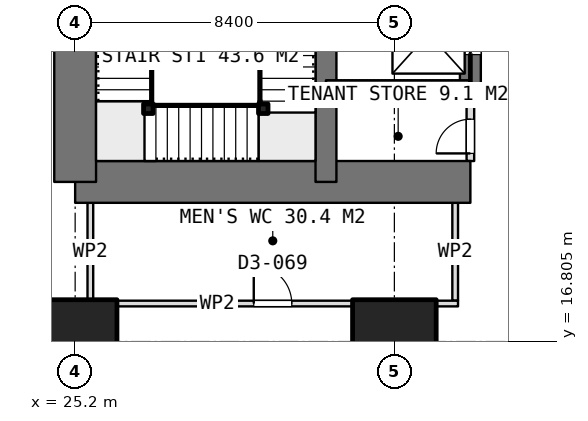
"""IFC4 building model, lengths in metres.
Left out: names, types, materials, properties, quantities, classifications, styles, units other than length and angle.
Written with IfcOpenShell. Run it as: python <this file> out.ifc"""

import sys

from ifc_helpers import new_model, si_unit, direction, frame, frame_2d, origin, origin_2d, place, context, subcontext, project, spatial, rectangle, extrude, element, fill, save


model = new_model("IFC4")
c1 = context("Model", 3, precision=1e-05, world=origin(), true_north=direction((0.0, 1.0)))
c2 = subcontext(c1, "Body", "Model", "MODEL_VIEW")
j1 = project(units=[si_unit("LENGTHUNIT", "METRE"), si_unit("PLANEANGLEUNIT", "RADIAN")], contexts=[c1])
p1 = place(None, origin())
s1 = spatial("IfcSite", under=j1, at=p1, CompositionType="ELEMENT")
p2 = place(p1, origin())
s2 = spatial("IfcBuilding", under=s1, at=p2, CompositionType="ELEMENT")
p3 = place(p2, frame((0.0, 0.0, 62.9)))
s3 = spatial("IfcBuildingStorey", under=s2, at=p3, CompositionType="ELEMENT", Elevation=62.9)
p4 = place(p3, frame((25.2, 21.0, 0.0), z_axis=(0.0, 0.0, 1.0), x_axis=(1.0, 0.0, 0.0)))
e1 = element("IfcWall", 1, at=p4, inside=s3, PredefinedType="SHEAR", context=c2, shape_type="SweptSolid", body=[
    extrude(rectangle(XDim=10.4, YDim=1.1, at=frame_2d((5.2, 0.0))), origin(), (0.0, 0.0, 1.0), 3.75),
])
p5 = place(p3, frame((25.2, 21.0, 0.0), z_axis=(0.0, 0.0, 1.0), x_axis=(0.0, 1.0, 0.0)))
e2 = element("IfcWall", 2, at=p5, inside=s3, PredefinedType="SHEAR", context=c2, shape_type="SweptSolid", body=[
    extrude(rectangle(XDim=25.2, YDim=1.1, at=frame_2d((12.6, 0.0))), origin(), (0.0, 0.0, 1.0), 3.75),
])
p6 = place(p5, frame((7.8, 0.0, 0.0)))
e3 = element("IfcOpeningElement", 3, at=p6, cuts=e2, PredefinedType="OPENING", context=c2, shape_type="SweptSolid", body=[
    extrude(rectangle(XDim=1.2, YDim=2.1, at=frame_2d((0.6, 1.05))), frame((0.0, 0.56, 0.0), z_axis=(0.0, -1.0, 0.0), x_axis=(1.0, 0.0, 0.0)), (0.0, 0.0, 1.0), 1.12),
])
p7 = place(p5, frame((14.25, 0.0, 0.0)))
e4 = element("IfcOpeningElement", 4, at=p7, cuts=e2, PredefinedType="OPENING", context=c2, shape_type="SweptSolid", body=[
    extrude(rectangle(XDim=0.9, YDim=2.1, at=frame_2d((0.45, 1.05))), frame((0.0, 0.56, 0.0), z_axis=(0.0, -1.0, 0.0), x_axis=(1.0, 0.0, 0.0)), (0.0, 0.0, 1.0), 1.12),
])
p8 = place(p5, frame((16.85, 0.0, 0.0)))
e5 = element("IfcOpeningElement", 5, at=p8, cuts=e2, PredefinedType="OPENING", context=c2, shape_type="SweptSolid", body=[
    extrude(rectangle(XDim=0.9, YDim=2.1, at=frame_2d((0.45, 1.05))), frame((0.0, 0.56, 0.0), z_axis=(0.0, -1.0, 0.0), x_axis=(1.0, 0.0, 0.0)), (0.0, 0.0, 1.0), 1.12),
])
p9 = place(p5, frame((19.075, 0.0, 0.0)))
e6 = element("IfcOpeningElement", 6, at=p9, cuts=e2, PredefinedType="OPENING", context=c2, shape_type="SweptSolid", body=[
    extrude(rectangle(XDim=1.2, YDim=2.1, at=frame_2d((0.6, 1.05))), frame((0.0, 0.56, 0.0), z_axis=(0.0, -1.0, 0.0), x_axis=(1.0, 0.0, 0.0)), (0.0, 0.0, 1.0), 1.12),
])
p10 = place(p3, frame((31.8, 21.0, 0.0), z_axis=(0.0, 0.0, 1.0), x_axis=(0.0, 1.0, 0.0)))
e7 = element("IfcWall", 7, at=p10, inside=s3, PredefinedType="SHEAR", context=c2, shape_type="SweptSolid", body=[
    extrude(rectangle(XDim=25.2, YDim=0.55, at=frame_2d((12.6, 0.0))), origin(), (0.0, 0.0, 1.0), 3.75),
])
p11 = place(p3, frame((35.6, 23.4, 0.0), z_axis=(0.0, 0.0, 1.0), x_axis=(0.0, 1.0, 0.0)))
e8 = element("IfcWall", 8, at=p11, inside=s3, PredefinedType="SHEAR", context=c2, shape_type="SweptSolid", body=[
    extrude(rectangle(XDim=18.0, YDim=0.55, at=frame_2d((9.0, 0.0))), origin(), (0.0, 0.0, 1.0), 3.75),
])
p12 = place(p11, frame((0.95, 0.0, 0.0)))
e9 = element("IfcOpeningElement", 9, at=p12, cuts=e8, PredefinedType="OPENING", context=c2, shape_type="SweptSolid", body=[
    extrude(rectangle(XDim=1.1, YDim=2.1, at=frame_2d((0.55, 1.05))), frame((0.0, 0.285, 0.0), z_axis=(0.0, -1.0, 0.0), x_axis=(1.0, 0.0, 0.0)), (0.0, 0.0, 1.0), 0.57),
])
p13 = place(p11, frame((3.95, 0.0, 0.0)))
e10 = element("IfcOpeningElement", 10, at=p13, cuts=e8, PredefinedType="OPENING", context=c2, shape_type="SweptSolid", body=[
    extrude(rectangle(XDim=1.1, YDim=2.1, at=frame_2d((0.55, 1.05))), frame((0.0, 0.285, 0.0), z_axis=(0.0, -1.0, 0.0), x_axis=(1.0, 0.0, 0.0)), (0.0, 0.0, 1.0), 0.57),
])
p14 = place(p11, frame((6.95, 0.0, 0.0)))
e11 = element("IfcOpeningElement", 11, at=p14, cuts=e8, PredefinedType="OPENING", context=c2, shape_type="SweptSolid", body=[
    extrude(rectangle(XDim=1.1, YDim=2.1, at=frame_2d((0.55, 1.05))), frame((0.0, 0.285, 0.0), z_axis=(0.0, -1.0, 0.0), x_axis=(1.0, 0.0, 0.0)), (0.0, 0.0, 1.0), 0.57),
])
p15 = place(p11, frame((9.95, 0.0, 0.0)))
e12 = element("IfcOpeningElement", 12, at=p15, cuts=e8, PredefinedType="OPENING", context=c2, shape_type="SweptSolid", body=[
    extrude(rectangle(XDim=1.1, YDim=2.1, at=frame_2d((0.55, 1.05))), frame((0.0, 0.285, 0.0), z_axis=(0.0, -1.0, 0.0), x_axis=(1.0, 0.0, 0.0)), (0.0, 0.0, 1.0), 0.57),
])
p16 = place(p11, frame((12.95, 0.0, 0.0)))
e13 = element("IfcOpeningElement", 13, at=p16, cuts=e8, PredefinedType="OPENING", context=c2, shape_type="SweptSolid", body=[
    extrude(rectangle(XDim=1.1, YDim=2.1, at=frame_2d((0.55, 1.05))), frame((0.0, 0.285, 0.0), z_axis=(0.0, -1.0, 0.0), x_axis=(1.0, 0.0, 0.0)), (0.0, 0.0, 1.0), 0.57),
])
p17 = place(p11, frame((15.95, 0.0, 0.0)))
e14 = element("IfcOpeningElement", 14, at=p17, cuts=e8, PredefinedType="OPENING", context=c2, shape_type="SweptSolid", body=[
    extrude(rectangle(XDim=1.1, YDim=2.1, at=frame_2d((0.55, 1.05))), frame((0.0, 0.285, 0.0), z_axis=(0.0, -1.0, 0.0), x_axis=(1.0, 0.0, 0.0)), (0.0, 0.0, 1.0), 0.57),
])
p18 = place(p3, frame((31.8, 23.4, 0.0), z_axis=(0.0, 0.0, 1.0), x_axis=(1.0, 0.0, 0.0)))
e15 = element("IfcWall", 15, at=p18, inside=s3, PredefinedType="SHEAR", context=c2, shape_type="SweptSolid", body=[
    extrude(rectangle(XDim=3.8, YDim=0.55, at=frame_2d((1.9, 0.0))), origin(), (0.0, 0.0, 1.0), 3.75),
])
for number, where, z_axis, x_axis in (
    (16, (25.2, 16.8, 0.0), (0.0, 0.0, 1.0), (1.0, 0.0, 0.0)),
    (17, (33.6, 16.8, 0.0), (0.0, 0.0, 1.0), (1.0, 0.0, 0.0)),
):
    element("IfcColumn", number, at=place(p3, frame(where, z_axis=z_axis, x_axis=x_axis)), inside=s3, PredefinedType="COLUMN", context=c2, shape_type="SweptSolid", body=[
        extrude(rectangle(XDim=2.2, YDim=2.2, at=origin_2d()), origin(), (0.0, 0.0, 1.0), 3.75),
    ])
p19 = place(p3, frame((35.6, 21.55, 0.0), z_axis=(0.0, 0.0, 1.0), x_axis=(0.0, 1.0, 0.0)))
e18 = element("IfcWall", 18, at=p19, inside=s3, PredefinedType="PARTITIONING", context=c2, shape_type="SweptSolid", body=[
    extrude(rectangle(XDim=1.575, YDim=0.2, at=frame_2d((0.788, 0.0))), origin(), (0.0, 0.0, 1.0), 3.5),
])
p20 = place(p19, frame((0.2, 0.0, 0.0)))
e19 = element("IfcOpeningElement", 19, at=p20, cuts=e18, PredefinedType="OPENING", context=c2, shape_type="SweptSolid", body=[
    extrude(rectangle(XDim=0.9, YDim=2.1, at=frame_2d((0.45, 1.05))), frame((0.0, 0.11, 0.0), z_axis=(0.0, -1.0, 0.0), x_axis=(1.0, 0.0, 0.0)), (0.0, 0.0, 1.0), 0.22),
])
p21 = place(p3, frame((25.525, 17.8, 0.0), z_axis=(0.0, 0.0, 1.0), x_axis=(1.0, 0.0, 0.0)))
e20 = element("IfcWall", 20, at=p21, inside=s3, PredefinedType="PARTITIONING", context=c2, shape_type="SweptSolid", body=[
    extrude(rectangle(XDim=9.75, YDim=0.15, at=frame_2d((4.875, 0.0))), origin(), (0.0, 0.0, 1.0), 3.5),
])
p22 = place(p21, frame((4.375, 0.0, 0.0)))
e21 = element("IfcOpeningElement", 21, at=p22, cuts=e20, PredefinedType="OPENING", context=c2, shape_type="SweptSolid", body=[
    extrude(rectangle(XDim=1.0, YDim=2.1, at=frame_2d((0.5, 1.05))), frame((0.0, 0.085, 0.0), z_axis=(0.0, -1.0, 0.0), x_axis=(1.0, 0.0, 0.0)), (0.0, 0.0, 1.0), 0.17),
])
for number, where, z_axis, x_axis in (
    (22, (25.6, 17.875, 0.0), (0.0, 0.0, 1.0), (0.0, 1.0, 0.0)),
    (23, (35.2, 17.875, 0.0), (0.0, 0.0, 1.0), (0.0, 1.0, 0.0)),
):
    element("IfcWall", number, at=place(p3, frame(where, z_axis=z_axis, x_axis=x_axis)), inside=s3, PredefinedType="PARTITIONING", context=c2, shape_type="SweptSolid", body=[
        extrude(rectangle(XDim=2.575, YDim=0.15, at=frame_2d((1.288, 0.0))), origin(), (0.0, 0.0, 1.0), 3.5),
    ])
for number, where, z_axis, x_axis in (
    (24, (30.15, 22.925, 0.0), (0.0, 0.0, 1.0), (1.0, 0.0, 0.0)),
    (25, (27.125, 22.925, 0.0), (0.0, 0.0, 1.0), (1.0, 0.0, 0.0)),
):
    element("IfcColumn", number, at=place(p3, frame(where, z_axis=z_axis, x_axis=x_axis)), inside=s3, PredefinedType="COLUMN", context=c2, shape_type="SweptSolid", body=[
        extrude(rectangle(XDim=0.25, YDim=0.25, at=origin_2d()), origin(), (0.0, 0.0, 1.0), 3.75),
    ])
p23 = place(p20, origin())
e26 = element("IfcDoor", 26, at=p23, inside=s3, OperationType="SINGLE_SWING_LEFT", PredefinedType="DOOR", context=c2, shape_type="SweptSolid", body=[
    extrude(rectangle(XDim=0.9, YDim=2.1, at=frame_2d((0.45, 1.05))), frame((0.0, 0.025, 0.0), z_axis=(0.0, -1.0, 0.0), x_axis=(1.0, 0.0, 0.0)), (0.0, 0.0, 1.0), 0.05),
])
fill(e19, e26)
p24 = place(p12, origin())
e27 = element("IfcDoor", 27, at=p24, inside=s3, OperationType="SLIDING_TO_LEFT", PredefinedType="USERDEFINED", context=c2, shape_type="SweptSolid", body=[
    extrude(rectangle(XDim=1.1, YDim=2.1, at=frame_2d((0.55, 1.05))), frame((0.0, 0.025, 0.0), z_axis=(0.0, -1.0, 0.0), x_axis=(1.0, 0.0, 0.0)), (0.0, 0.0, 1.0), 0.05),
])
fill(e9, e27)
p25 = place(p22, origin())
e28 = element("IfcDoor", 28, at=p25, inside=s3, OperationType="SINGLE_SWING_LEFT", PredefinedType="DOOR", context=c2, shape_type="SweptSolid", body=[
    extrude(rectangle(XDim=1.0, YDim=2.1, at=frame_2d((0.5, 1.05))), frame((0.0, 0.025, 0.0), z_axis=(0.0, -1.0, 0.0), x_axis=(1.0, 0.0, 0.0)), (0.0, 0.0, 1.0), 0.05),
])
fill(e21, e28)
save(model, sys.argv[1])
